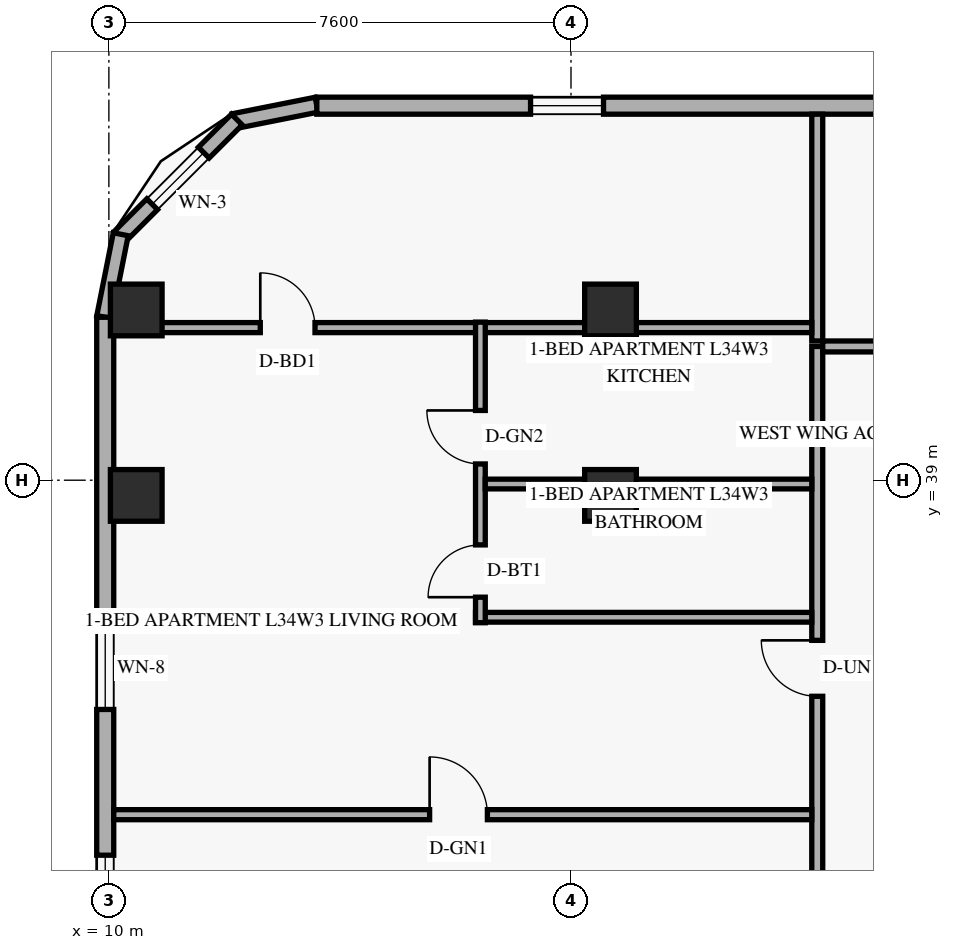
"""IFC4 building model, lengths in metres.
Left out: names, types, materials, properties, quantities, classifications, styles, units other than length and angle.
Written with IfcOpenShell. Run it as: python <this file> out.ifc"""

import sys

from ifc_helpers import new_model, si_unit, direction, frame, frame_2d, origin, origin_2d, place, context, subcontext, project, spatial, rectangle, extrude, element, fill, save


model = new_model("IFC4")
c1 = context("Model", 3, precision=1e-05, world=origin(), true_north=direction((0.0, 1.0)))
c2 = subcontext(c1, "Body", "Model", "MODEL_VIEW")
j1 = project(units=[si_unit("LENGTHUNIT", "METRE"), si_unit("PLANEANGLEUNIT", "RADIAN")], contexts=[c1])
p1 = place(None, origin())
s1 = spatial("IfcSite", under=j1, at=p1, CompositionType="ELEMENT")
p2 = place(p1, origin())
s2 = spatial("IfcBuilding", under=s1, at=p2, CompositionType="ELEMENT")
p3 = place(p2, frame((0.0, 0.0, 132.0)))
s3 = spatial("IfcBuildingStorey", under=s2, at=p3, CompositionType="ELEMENT", Elevation=132.0)
for number, where, z_axis, x_axis in (
    (1, (10.45, 38.75, 0.0), (0.0, 0.0, 1.0), (1.0, 0.0, 0.0)),
    (2, (10.45, 41.8, 0.0), (0.0, 0.0, 1.0), (1.0, 0.0, 0.0)),
    (3, (18.25, 38.75, 0.0), (0.0, 0.0, 1.0), (1.0, 0.0, 0.0)),
    (4, (18.25, 41.8, 0.0), (0.0, 0.0, 1.0), (1.0, 0.0, 0.0)),
):
    element("IfcColumn", number, at=place(p3, frame(where, z_axis=z_axis, x_axis=x_axis)), inside=s3, PredefinedType="COLUMN", context=c2, shape_type="SweptSolid", body=[
        extrude(rectangle(XDim=0.85, YDim=0.85, at=origin_2d()), origin(), (0.0, 0.0, 1.0), 3.6),
    ])
p4 = place(p3, frame((13.417, 45.176, 0.0), z_axis=(0.0, 0.0, 1.0), x_axis=(-0.980809899341, -0.19496651342, 0.0)))
e5 = element("IfcWall", 5, at=p4, inside=s3, PredefinedType="SOLIDWALL", context=c2, shape_type="SweptSolid", body=[
    extrude(rectangle(XDim=1.389, YDim=0.25, at=frame_2d((0.694, 0.0))), origin(), (0.0, 0.0, 1.0), 3.3),
])
p5 = place(p3, frame((12.105, 44.932, 0.0), z_axis=(0.0, 0.0, 1.0), x_axis=(-0.707151344399, -0.707062215165, 0.0)))
e6 = element("IfcWall", 6, at=p5, inside=s3, PredefinedType="SOLIDWALL", context=c2, shape_type="SweptSolid", body=[
    extrude(rectangle(XDim=2.739, YDim=0.25, at=frame_2d((1.37, 0.0))), origin(), (0.0, 0.0, 1.0), 3.3),
])
p6 = place(p5, frame((0.77, 0.0, 0.85)))
e7 = element("IfcOpeningElement", 7, at=p6, cuts=e6, PredefinedType="OPENING", context=c2, shape_type="SweptSolid", body=[
    extrude(rectangle(XDim=1.2, YDim=1.5, at=frame_2d((0.6, 0.75))), frame((0.0, 0.135, 0.0), z_axis=(0.0, -1.0, 0.0), x_axis=(1.0, 0.0, 0.0)), (0.0, 0.0, 1.0), 0.27),
])
p7 = place(p3, frame((10.195, 43.045, 0.0), z_axis=(0.0, 0.0, 1.0), x_axis=(-0.195000137217, -0.980803214965, 0.0)))
e8 = element("IfcWall", 8, at=p7, inside=s3, PredefinedType="SOLIDWALL", context=c2, shape_type="SweptSolid", body=[
    extrude(rectangle(XDim=1.388, YDim=0.25, at=frame_2d((0.694, 0.0))), origin(), (0.0, 0.0, 1.0), 3.3),
])
p8 = place(p3, frame((49.98, 45.16, 0.0), z_axis=(0.0, 0.0, 1.0), x_axis=(-1.0, 0.0, 0.0)))
e9 = element("IfcWall", 9, at=p8, inside=s3, PredefinedType="SOLIDWALL", context=c2, shape_type="SweptSolid", body=[
    extrude(rectangle(XDim=36.56, YDim=0.28, at=frame_2d((18.28, 0.0))), origin(), (0.0, 0.0, 1.0), 3.3),
])
p9 = place(p8, frame((31.845, 0.0, 0.85)))
e10 = element("IfcOpeningElement", 10, at=p9, cuts=e9, PredefinedType="OPENING", context=c2, shape_type="SweptSolid", body=[
    extrude(rectangle(XDim=1.2, YDim=1.5, at=frame_2d((0.6, 0.75))), frame((0.0, 0.15, 0.0), z_axis=(0.0, -1.0, 0.0), x_axis=(1.0, 0.0, 0.0)), (0.0, 0.0, 1.0), 0.3),
])
p10 = place(p8, frame((23.355, 0.0, 0.85)))
e11 = element("IfcOpeningElement", 11, at=p10, cuts=e9, PredefinedType="OPENING", context=c2, shape_type="SweptSolid", body=[
    extrude(rectangle(XDim=1.2, YDim=1.5, at=frame_2d((0.6, 0.75))), frame((0.0, 0.15, 0.0), z_axis=(0.0, -1.0, 0.0), x_axis=(1.0, 0.0, 0.0)), (0.0, 0.0, 1.0), 0.3),
])
p11 = place(p8, frame((16.47, 0.0, 0.85)))
e12 = element("IfcOpeningElement", 12, at=p11, cuts=e9, PredefinedType="OPENING", context=c2, shape_type="SweptSolid", body=[
    extrude(rectangle(XDim=1.2, YDim=1.5, at=frame_2d((0.6, 0.75))), frame((0.0, 0.15, 0.0), z_axis=(0.0, -1.0, 0.0), x_axis=(1.0, 0.0, 0.0)), (0.0, 0.0, 1.0), 0.3),
])
p12 = place(p8, frame((10.565, 0.0, 0.85)))
e13 = element("IfcOpeningElement", 13, at=p12, cuts=e9, PredefinedType="OPENING", context=c2, shape_type="SweptSolid", body=[
    extrude(rectangle(XDim=1.2, YDim=1.5, at=frame_2d((0.6, 0.75))), frame((0.0, 0.15, 0.0), z_axis=(0.0, -1.0, 0.0), x_axis=(1.0, 0.0, 0.0)), (0.0, 0.0, 1.0), 0.3),
])
p13 = place(p8, frame((4.675, 0.0, 0.85)))
e14 = element("IfcOpeningElement", 14, at=p13, cuts=e9, PredefinedType="OPENING", context=c2, shape_type="SweptSolid", body=[
    extrude(rectangle(XDim=1.2, YDim=1.5, at=frame_2d((0.6, 0.75))), frame((0.0, 0.15, 0.0), z_axis=(0.0, -1.0, 0.0), x_axis=(1.0, 0.0, 0.0)), (0.0, 0.0, 1.0), 0.3),
])
p14 = place(p8, frame((0.79, 0.0, 0.85)))
e15 = element("IfcOpeningElement", 15, at=p14, cuts=e9, PredefinedType="OPENING", context=c2, shape_type="SweptSolid", body=[
    extrude(rectangle(XDim=1.2, YDim=1.5, at=frame_2d((0.6, 0.75))), frame((0.0, 0.15, 0.0), z_axis=(0.0, -1.0, 0.0), x_axis=(1.0, 0.0, 0.0)), (0.0, 0.0, 1.0), 0.3),
])
p15 = place(p3, frame((9.94, 41.68, 0.0), z_axis=(0.0, 0.0, 1.0), x_axis=(0.0, -1.0, 0.0)))
e16 = element("IfcWall", 16, at=p15, inside=s3, PredefinedType="SOLIDWALL", context=c2, shape_type="SweptSolid", body=[
    extrude(rectangle(XDim=35.36, YDim=0.28, at=frame_2d((17.68, 0.0))), origin(), (0.0, 0.0, 1.0), 3.3),
])
p16 = place(p15, frame((28.42, 0.0, 0.85)))
e17 = element("IfcOpeningElement", 17, at=p16, cuts=e16, PredefinedType="OPENING", context=c2, shape_type="SweptSolid", body=[
    extrude(rectangle(XDim=1.35, YDim=1.55, at=frame_2d((0.675, 0.775))), frame((0.0, 0.15, 0.0), z_axis=(0.0, -1.0, 0.0), x_axis=(1.0, 0.0, 0.0)), (0.0, 0.0, 1.0), 0.3),
])
p17 = place(p15, frame((22.037, 0.0, 0.85)))
e18 = element("IfcOpeningElement", 18, at=p17, cuts=e16, PredefinedType="OPENING", context=c2, shape_type="SweptSolid", body=[
    extrude(rectangle(XDim=1.35, YDim=1.55, at=frame_2d((0.675, 0.775))), frame((0.0, 0.15, 0.0), z_axis=(0.0, -1.0, 0.0), x_axis=(1.0, 0.0, 0.0)), (0.0, 0.0, 1.0), 0.3),
])
p18 = place(p15, frame((17.619, 0.0, 0.85)))
e19 = element("IfcOpeningElement", 19, at=p18, cuts=e16, PredefinedType="OPENING", context=c2, shape_type="SweptSolid", body=[
    extrude(rectangle(XDim=1.35, YDim=1.55, at=frame_2d((0.675, 0.775))), frame((0.0, 0.15, 0.0), z_axis=(0.0, -1.0, 0.0), x_axis=(1.0, 0.0, 0.0)), (0.0, 0.0, 1.0), 0.3),
])
p19 = place(p15, frame((12.712, 0.0, 0.85)))
e20 = element("IfcOpeningElement", 20, at=p19, cuts=e16, PredefinedType="OPENING", context=c2, shape_type="SweptSolid", body=[
    extrude(rectangle(XDim=1.35, YDim=1.55, at=frame_2d((0.675, 0.775))), frame((0.0, 0.15, 0.0), z_axis=(0.0, -1.0, 0.0), x_axis=(1.0, 0.0, 0.0)), (0.0, 0.0, 1.0), 0.3),
])
p20 = place(p15, frame((8.848, 0.0, 0.85)))
e21 = element("IfcOpeningElement", 21, at=p20, cuts=e16, PredefinedType="OPENING", context=c2, shape_type="SweptSolid", body=[
    extrude(rectangle(XDim=1.35, YDim=1.55, at=frame_2d((0.675, 0.775))), frame((0.0, 0.15, 0.0), z_axis=(0.0, -1.0, 0.0), x_axis=(1.0, 0.0, 0.0)), (0.0, 0.0, 1.0), 0.3),
])
p21 = place(p15, frame((5.101, 0.0, 0.85)))
e22 = element("IfcOpeningElement", 22, at=p21, cuts=e16, PredefinedType="OPENING", context=c2, shape_type="SweptSolid", body=[
    extrude(rectangle(XDim=1.35, YDim=1.55, at=frame_2d((0.675, 0.775))), frame((0.0, 0.15, 0.0), z_axis=(0.0, -1.0, 0.0), x_axis=(1.0, 0.0, 0.0)), (0.0, 0.0, 1.0), 0.3),
])
p22 = place(p3, frame((21.65, 6.8, 0.0), z_axis=(0.0, 0.0, 1.0), x_axis=(0.0, 1.0, 0.0)))
e23 = element("IfcWall", 23, at=p22, inside=s3, PredefinedType="STANDARD", context=c2, shape_type="SweptSolid", body=[
    extrude(rectangle(XDim=34.4, YDim=0.18, at=frame_2d((17.2, 0.0))), origin(), (0.0, 0.0, 1.0), 2.671),
])
p23 = place(p22, frame((5.107, 0.0, 0.0)))
e24 = element("IfcOpeningElement", 24, at=p23, cuts=e23, PredefinedType="OPENING", context=c2, shape_type="SweptSolid", body=[
    extrude(rectangle(XDim=0.92, YDim=2.15, at=frame_2d((0.46, 1.075))), frame((0.0, 0.1, 0.0), z_axis=(0.0, -1.0, 0.0), x_axis=(1.0, 0.0, 0.0)), (0.0, 0.0, 1.0), 0.2),
])
p24 = place(p22, frame((13.99, 0.0, 0.0)))
e25 = element("IfcOpeningElement", 25, at=p24, cuts=e23, PredefinedType="OPENING", context=c2, shape_type="SweptSolid", body=[
    extrude(rectangle(XDim=0.92, YDim=2.15, at=frame_2d((0.46, 1.075))), frame((0.0, 0.1, 0.0), z_axis=(0.0, -1.0, 0.0), x_axis=(1.0, 0.0, 0.0)), (0.0, 0.0, 1.0), 0.2),
])
p25 = place(p22, frame((28.646, 0.0, 0.0)))
e26 = element("IfcOpeningElement", 26, at=p25, cuts=e23, PredefinedType="OPENING", context=c2, shape_type="SweptSolid", body=[
    extrude(rectangle(XDim=0.92, YDim=2.15, at=frame_2d((0.46, 1.075))), frame((0.0, 0.1, 0.0), z_axis=(0.0, -1.0, 0.0), x_axis=(1.0, 0.0, 0.0)), (0.0, 0.0, 1.0), 0.2),
])
p26 = place(p3, frame((21.74, 41.2, 0.0), z_axis=(0.0, 0.0, 1.0), x_axis=(1.0, 0.0, 0.0)))
e27 = element("IfcWall", 27, at=p26, inside=s3, PredefinedType="STANDARD", context=c2, shape_type="SweptSolid", body=[
    extrude(rectangle(XDim=13.68, YDim=0.18, at=frame_2d((6.84, 0.0))), origin(), (0.0, 0.0, 1.0), 2.671),
])
p27 = place(p26, frame((3.09, 0.0, 0.0)))
e28 = element("IfcOpeningElement", 28, at=p27, cuts=e27, PredefinedType="OPENING", context=c2, shape_type="SweptSolid", body=[
    extrude(rectangle(XDim=0.95, YDim=2.15, at=frame_2d((0.475, 1.075))), frame((0.0, 0.1, 0.0), z_axis=(0.0, -1.0, 0.0), x_axis=(1.0, 0.0, 0.0)), (0.0, 0.0, 1.0), 0.2),
])
p28 = place(p26, frame((10.11, 0.0, 0.0)))
e29 = element("IfcOpeningElement", 29, at=p28, cuts=e27, PredefinedType="OPENING", context=c2, shape_type="SweptSolid", body=[
    extrude(rectangle(XDim=0.95, YDim=2.15, at=frame_2d((0.475, 1.075))), frame((0.0, 0.1, 0.0), z_axis=(0.0, -1.0, 0.0), x_axis=(1.0, 0.0, 0.0)), (0.0, 0.0, 1.0), 0.2),
])
p29 = place(p3, frame((21.65, 41.29, 0.0), z_axis=(0.0, 0.0, 1.0), x_axis=(0.0, 1.0, 0.0)))
e30 = element("IfcWall", 30, at=p29, inside=s3, PredefinedType="PARTITIONING", context=c2, shape_type="SweptSolid", body=[
    extrude(rectangle(XDim=3.73, YDim=0.18, at=frame_2d((1.865, 0.0))), origin(), (0.0, 0.0, 1.0), 2.749),
])
p30 = place(p3, frame((10.08, 41.51, 0.0), z_axis=(0.0, 0.0, 1.0), x_axis=(1.0, 0.0, 0.0)))
e31 = element("IfcWall", 31, at=p30, inside=s3, PredefinedType="PARTITIONING", context=c2, shape_type="SweptSolid", body=[
    extrude(rectangle(XDim=11.48, YDim=0.165, at=frame_2d((5.74, 0.0))), origin(), (0.0, 0.0, 1.0), 3.3),
])
p31 = place(p30, frame((2.41, 0.0, 0.0)))
e32 = element("IfcOpeningElement", 32, at=p31, cuts=e31, PredefinedType="OPENING", context=c2, shape_type="SweptSolid", body=[
    extrude(rectangle(XDim=0.9, YDim=2.14, at=frame_2d((0.45, 1.07))), frame((0.0, 0.093, 0.0), z_axis=(0.0, -1.0, 0.0), x_axis=(1.0, 0.0, 0.0)), (0.0, 0.0, 1.0), 0.185),
])
p32 = place(p3, frame((16.03, 36.746, 0.0), z_axis=(0.0, 0.0, 1.0), x_axis=(1.0, 0.0, 0.0)))
e33 = element("IfcWall", 33, at=p32, inside=s3, PredefinedType="PLUMBINGWALL", context=c2, shape_type="SweptSolid", body=[
    extrude(rectangle(XDim=5.53, YDim=0.16, at=frame_2d((2.765, 0.0))), origin(), (0.0, 0.0, 1.0), 2.671),
])
p33 = place(p3, frame((16.11, 36.656, 0.0), z_axis=(0.0, 0.0, 1.0), x_axis=(0.0, 1.0, 0.0)))
e34 = element("IfcWall", 34, at=p33, inside=s3, PredefinedType="PLUMBINGWALL", context=c2, shape_type="SweptSolid", body=[
    extrude(rectangle(XDim=4.944, YDim=0.16, at=frame_2d((2.472, 0.0))), origin(), (0.0, 0.0, 1.0), 2.671),
])
p34 = place(p33, frame((0.42, 0.0, 0.0)))
e35 = element("IfcOpeningElement", 35, at=p34, cuts=e34, PredefinedType="OPENING", context=c2, shape_type="SweptSolid", body=[
    extrude(rectangle(XDim=0.86, YDim=2.12, at=frame_2d((0.43, 1.06))), frame((0.0, 0.09, 0.0), z_axis=(0.0, -1.0, 0.0), x_axis=(1.0, 0.0, 0.0)), (0.0, 0.0, 1.0), 0.18),
])
p35 = place(p33, frame((2.611, 0.0, 0.0)))
e36 = element("IfcOpeningElement", 36, at=p35, cuts=e34, PredefinedType="OPENING", context=c2, shape_type="SweptSolid", body=[
    extrude(rectangle(XDim=0.88, YDim=2.12, at=frame_2d((0.44, 1.06))), frame((0.0, 0.09, 0.0), z_axis=(0.0, -1.0, 0.0), x_axis=(1.0, 0.0, 0.0)), (0.0, 0.0, 1.0), 0.18),
])
p36 = place(p3, frame((16.19, 38.938, 0.0), z_axis=(0.0, 0.0, 1.0), x_axis=(1.0, 0.0, 0.0)))
e37 = element("IfcWall", 37, at=p36, inside=s3, PredefinedType="PLUMBINGWALL", context=c2, shape_type="SweptSolid", body=[
    extrude(rectangle(XDim=5.37, YDim=0.16, at=frame_2d((2.685, 0.0))), origin(), (0.0, 0.0, 1.0), 2.671),
])
p37 = place(p3, frame((10.08, 33.499, 0.0), z_axis=(0.0, 0.0, 1.0), x_axis=(1.0, 0.0, 0.0)))
e38 = element("IfcWall", 38, at=p37, inside=s3, PredefinedType="PARTITIONING", context=c2, shape_type="SweptSolid", body=[
    extrude(rectangle(XDim=11.48, YDim=0.165, at=frame_2d((5.74, 0.0))), origin(), (0.0, 0.0, 1.0), 2.671),
])
p38 = place(p37, frame((5.195, 0.0, 0.0)))
e39 = element("IfcOpeningElement", 39, at=p38, cuts=e38, PredefinedType="OPENING", context=c2, shape_type="SweptSolid", body=[
    extrude(rectangle(XDim=0.95, YDim=2.15, at=frame_2d((0.475, 1.075))), frame((0.0, 0.093, 0.0), z_axis=(0.0, -1.0, 0.0), x_axis=(1.0, 0.0, 0.0)), (0.0, 0.0, 1.0), 0.185),
])
p39 = place(p6, origin())
e40 = element("IfcWindow", 40, at=p39, inside=s3, PartitioningType="SINGLE_PANEL", PredefinedType="WINDOW", context=c2, shape_type="SweptSolid", body=[
    extrude(rectangle(XDim=1.2, YDim=1.5, at=frame_2d((0.6, 0.75))), frame((0.0, 0.03, 0.0), z_axis=(0.0, -1.0, 0.0), x_axis=(1.0, 0.0, 0.0)), (0.0, 0.0, 1.0), 0.06),
])
fill(e7, e40)
p40 = place(p9, origin())
e41 = element("IfcWindow", 41, at=p40, inside=s3, PartitioningType="SINGLE_PANEL", PredefinedType="WINDOW", context=c2, shape_type="SweptSolid", body=[
    extrude(rectangle(XDim=1.2, YDim=1.5, at=frame_2d((0.6, 0.75))), frame((0.0, 0.03, 0.0), z_axis=(0.0, -1.0, 0.0), x_axis=(1.0, 0.0, 0.0)), (0.0, 0.0, 1.0), 0.06),
])
fill(e10, e41)
p41 = place(p20, origin())
e42 = element("IfcWindow", 42, at=p41, inside=s3, PartitioningType="SINGLE_PANEL", PredefinedType="WINDOW", context=c2, shape_type="SweptSolid", body=[
    extrude(rectangle(XDim=1.35, YDim=1.55, at=frame_2d((0.675, 0.775))), frame((0.0, 0.03, 0.0), z_axis=(0.0, -1.0, 0.0), x_axis=(1.0, 0.0, 0.0)), (0.0, 0.0, 1.0), 0.06),
])
fill(e21, e42)
p42 = place(p21, origin())
e43 = element("IfcWindow", 43, at=p42, inside=s3, PartitioningType="SINGLE_PANEL", PredefinedType="WINDOW", context=c2, shape_type="SweptSolid", body=[
    extrude(rectangle(XDim=1.35, YDim=1.55, at=frame_2d((0.675, 0.775))), frame((0.0, 0.03, 0.0), z_axis=(0.0, -1.0, 0.0), x_axis=(1.0, 0.0, 0.0)), (0.0, 0.0, 1.0), 0.06),
])
fill(e22, e43)
p43 = place(p38, origin())
e44 = element("IfcDoor", 44, at=p43, inside=s3, OperationType="SINGLE_SWING_LEFT", PredefinedType="DOOR", context=c2, shape_type="SweptSolid", body=[
    extrude(rectangle(XDim=0.95, YDim=2.15, at=frame_2d((0.475, 1.075))), frame((0.0, 0.025, 0.0), z_axis=(0.0, -1.0, 0.0), x_axis=(1.0, 0.0, 0.0)), (0.0, 0.0, 1.0), 0.05),
])
fill(e39, e44)
p44 = place(p25, origin())
e45 = element("IfcDoor", 45, at=p44, inside=s3, OperationType="SINGLE_SWING_RIGHT", PredefinedType="DOOR", context=c2, shape_type="SweptSolid", body=[
    extrude(rectangle(XDim=0.92, YDim=2.15, at=frame_2d((0.46, 1.075))), frame((0.0, 0.025, 0.0), z_axis=(0.0, -1.0, 0.0), x_axis=(1.0, 0.0, 0.0)), (0.0, 0.0, 1.0), 0.05),
])
fill(e26, e45)
p45 = place(p34, origin())
e46 = element("IfcDoor", 46, at=p45, inside=s3, OperationType="SINGLE_SWING_LEFT", PredefinedType="DOOR", context=c2, shape_type="SweptSolid", body=[
    extrude(rectangle(XDim=0.86, YDim=2.12, at=frame_2d((0.43, 1.06))), frame((0.0, 0.025, 0.0), z_axis=(0.0, -1.0, 0.0), x_axis=(1.0, 0.0, 0.0)), (0.0, 0.0, 1.0), 0.05),
])
fill(e35, e46)
p46 = place(p35, origin())
e47 = element("IfcDoor", 47, at=p46, inside=s3, OperationType="SINGLE_SWING_RIGHT", PredefinedType="DOOR", context=c2, shape_type="SweptSolid", body=[
    extrude(rectangle(XDim=0.88, YDim=2.12, at=frame_2d((0.44, 1.06))), frame((0.0, 0.025, 0.0), z_axis=(0.0, -1.0, 0.0), x_axis=(1.0, 0.0, 0.0)), (0.0, 0.0, 1.0), 0.05),
])
fill(e36, e47)
p47 = place(p31, origin())
e48 = element("IfcDoor", 48, at=p47, inside=s3, OperationType="SINGLE_SWING_LEFT", PredefinedType="DOOR", context=c2, shape_type="SweptSolid", body=[
    extrude(rectangle(XDim=0.9, YDim=2.14, at=frame_2d((0.45, 1.07))), frame((0.0, 0.025, 0.0), z_axis=(0.0, -1.0, 0.0), x_axis=(1.0, 0.0, 0.0)), (0.0, 0.0, 1.0), 0.05),
])
fill(e32, e48)
save(model, sys.argv[1])
